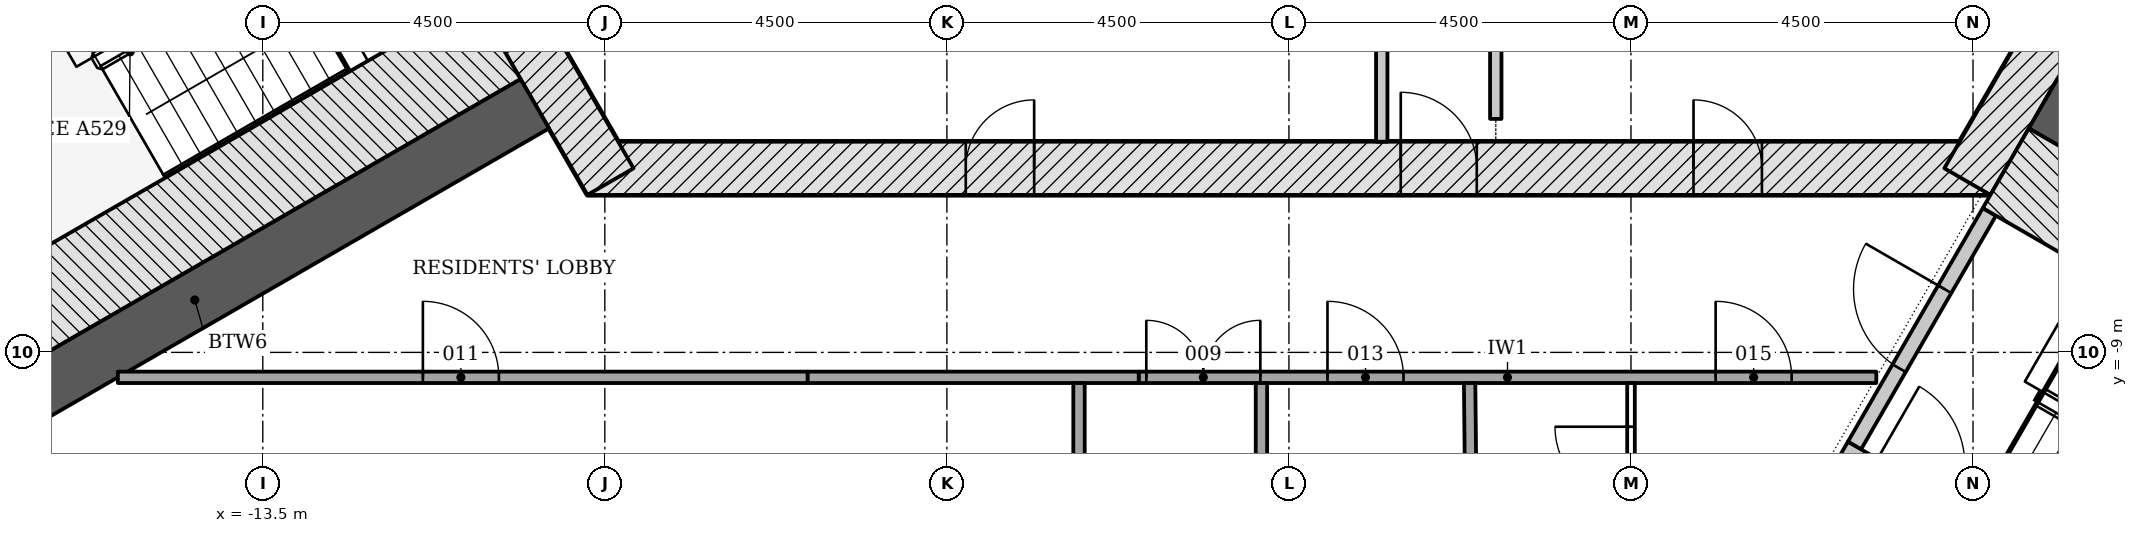
"""IFC4 building model, lengths in metres.
Left out: names, types, materials, properties, quantities, classifications, styles, units other than length and angle.
Written with IfcOpenShell. Run it as: python <this file> out.ifc"""

import sys

from ifc_helpers import new_model, si_unit, direction, frame, frame_2d, origin, place, context, subcontext, project, spatial, polyline, rectangle, outline, extrude, element, fill, save


model = new_model("IFC4")
c1 = context("Model", 3, precision=1e-05, world=origin(), true_north=direction((0.0, 1.0)))
c2 = subcontext(c1, "Body", "Model", "MODEL_VIEW")
j1 = project(units=[si_unit("LENGTHUNIT", "METRE"), si_unit("PLANEANGLEUNIT", "RADIAN")], contexts=[c1])
p1 = place(None, origin())
s1 = spatial("IfcSite", under=j1, at=p1, CompositionType="ELEMENT")
p2 = place(p1, origin())
s2 = spatial("IfcBuilding", under=s1, at=p2, CompositionType="ELEMENT")
p3 = place(p2, frame((0.0, 0.0, 158.1)))
s3 = spatial("IfcBuildingStorey", under=s2, at=p3, CompositionType="ELEMENT", Elevation=158.1)
p4 = place(p3, frame((-9.229, -6.578, -0.2), z_axis=(0.0, 0.0, 1.0), x_axis=(1.0, 0.0, 0.0)))
e1 = element("IfcWall", 1, at=p4, inside=s3, PredefinedType="SHEAR", context=c2, shape_type="SweptSolid", body=[
    extrude(rectangle(XDim=18.458, YDim=0.7, at=frame_2d((9.229, 0.0))), origin(), (0.0, 0.0, 1.0), 3.6),
])
p5 = place(p4, frame((10.7, 0.0, 0.2)))
e2 = element("IfcOpeningElement", 2, at=p5, cuts=e1, PredefinedType="OPENING", context=c2, shape_type="SweptSolid", body=[
    extrude(rectangle(XDim=1.0, YDim=2.1, at=frame_2d((0.5, 1.05))), frame((0.0, 0.36, 0.0), z_axis=(0.0, -1.0, 0.0), x_axis=(1.0, 0.0, 0.0)), (0.0, 0.0, 1.0), 0.72),
])
p6 = place(p4, frame((4.977, 0.0, 0.2)))
e3 = element("IfcOpeningElement", 3, at=p6, cuts=e1, PredefinedType="OPENING", context=c2, shape_type="SweptSolid", body=[
    extrude(rectangle(XDim=0.9, YDim=2.1, at=frame_2d((0.45, 1.05))), frame((0.0, 0.36, 0.0), z_axis=(0.0, -1.0, 0.0), x_axis=(1.0, 0.0, 0.0)), (0.0, 0.0, 1.0), 0.72),
])
p7 = place(p4, frame((14.552, 0.0, 0.2)))
e4 = element("IfcOpeningElement", 4, at=p7, cuts=e1, PredefinedType="OPENING", context=c2, shape_type="SweptSolid", body=[
    extrude(rectangle(XDim=0.9, YDim=2.1, at=frame_2d((0.45, 1.05))), frame((0.0, 0.36, 0.0), z_axis=(0.0, -1.0, 0.0), x_axis=(1.0, 0.0, 0.0)), (0.0, 0.0, 1.0), 0.72),
])
for number, where, z_axis, x_axis in (
    (5, (8.926, -6.753, -0.2), (0.0, 0.0, 1.0), (0.5, 0.866, 0.0)),
    (6, (-10.311, -4.353, -0.2), (0.0, 0.0, 1.0), (0.5, -0.866, 0.0)),
):
    element("IfcWall", number, at=place(p3, frame(where, z_axis=z_axis, x_axis=x_axis)), inside=s3, PredefinedType="SHEAR", context=c2, shape_type="SweptSolid", body=[
        extrude(rectangle(XDim=2.771, YDim=0.7, at=frame_2d((1.386, 0.0))), origin(), (0.0, 0.0, 1.0), 3.6),
    ])
for number, where, z_axis, x_axis in (
    (7, (-9.922, -5.728, -0.2), (0.0, 0.0, 1.0), (-0.866, -0.5, 0.0)),
    (8, (9.922, -5.728, -0.2), (0.0, 0.0, 1.0), (0.866, -0.5, 0.0)),
):
    element("IfcWall", number, at=place(p3, frame(where, z_axis=z_axis, x_axis=x_axis)), inside=s3, PredefinedType="SHEAR", context=c2, shape_type="SweptSolid", body=[
        extrude(rectangle(XDim=10.331, YDim=0.75, at=frame_2d((5.165, 0.0))), origin(), (0.0, 0.0, 1.0), 3.6),
    ])
p8 = place(p3, origin())
e9 = element("IfcWall", 9, at=p8, inside=s3, PredefinedType="NOTDEFINED", context=c2, shape_type="SweptSolid", body=[
    extrude(outline(polyline([(-21.545, -5.731), (-22.663, -8.078), (-23.092, -9.461), (-23.129, -10.908), (-22.773, -12.312), (-22.049, -13.566), (-21.011, -14.576), (-19.739, -15.267), (-18.327, -15.587), (-15.736, -15.793), (-15.712, -15.494), (-18.281, -15.29), (-19.632, -14.984), (-20.832, -14.333), (-21.81, -13.38), (-22.492, -12.198), (-22.828, -10.875), (-22.793, -9.51), (-22.382, -8.187), (-21.275, -5.86), (-21.545, -5.731)])), origin(), (0.0, 0.0, 1.0), 3.3),
])
p9 = place(p3, frame((1.221, 4.711, 0.0), z_axis=(0.0, 0.0, 1.0), x_axis=(0.0, -1.0, 0.0)))
e10 = element("IfcWall", 10, at=p9, inside=s3, PredefinedType="PARTITIONING", context=c2, shape_type="SweptSolid", body=[
    extrude(rectangle(XDim=10.939, YDim=0.15, at=frame_2d((5.47, 0.0))), origin(), (0.0, 0.0, 1.0), 3.4),
])
p10 = place(p9, frame((4.489, 0.0, 0.0)))
e11 = element("IfcOpeningElement", 11, at=p10, cuts=e10, PredefinedType="OPENING", context=c2, shape_type="SweptSolid", body=[
    extrude(rectangle(XDim=1.0, YDim=2.1, at=frame_2d((0.5, 1.05))), frame((0.0, 0.085, 0.0), z_axis=(0.0, -1.0, 0.0), x_axis=(1.0, 0.0, 0.0)), (0.0, 0.0, 1.0), 0.17),
])
p11 = place(p9, frame((0.671, 0.0, 0.0)))
e12 = element("IfcOpeningElement", 12, at=p11, cuts=e10, PredefinedType="OPENING", context=c2, shape_type="SweptSolid", body=[
    extrude(rectangle(XDim=0.9, YDim=2.1, at=frame_2d((0.45, 1.05))), frame((0.0, 0.085, 0.0), z_axis=(0.0, -1.0, 0.0), x_axis=(1.0, 0.0, 0.0)), (0.0, 0.0, 1.0), 0.17),
])
p12 = place(p3, frame((2.721, -5.928, 0.0), z_axis=(0.0, 0.0, 1.0), x_axis=(0.0, 1.0, 0.0)))
e13 = element("IfcWall", 13, at=p12, inside=s3, PredefinedType="PARTITIONING", context=c2, shape_type="SweptSolid", body=[
    extrude(rectangle(XDim=8.041, YDim=0.15, at=frame_2d((4.021, 0.0))), origin(), (0.0, 0.0, 1.0), 3.4),
])
p13 = place(p12, frame((5.02, 0.0, 0.0)))
e14 = element("IfcOpeningElement", 14, at=p13, cuts=e13, PredefinedType="OPENING", context=c2, shape_type="SweptSolid", body=[
    extrude(rectangle(XDim=0.9, YDim=2.1, at=frame_2d((0.45, 1.05))), frame((0.0, 0.085, 0.0), z_axis=(0.0, -1.0, 0.0), x_axis=(1.0, 0.0, 0.0)), (0.0, 0.0, 1.0), 0.17),
])
p14 = place(p3, frame((-10.412, -4.879, -0.2), z_axis=(0.0, 0.0, 1.0), x_axis=(-0.866026919366, -0.499997374926, 0.0)))
e15 = element("IfcWall", 15, at=p14, inside=s3, PredefinedType="SHEAR", context=c2, shape_type="SweptSolid", body=[
    extrude(rectangle(XDim=7.2, YDim=1.211, at=frame_2d((3.6, 0.0))), origin(), (0.0, 0.0, 1.0), 3.6),
])
p15 = place(p3, frame((7.44, -10.226, -0.2), z_axis=(0.0, 0.0, 1.0), x_axis=(0.500022077904, 0.866012656725, 0.0)))
e16 = element("IfcWall", 16, at=p15, inside=s3, PredefinedType="SHEAR", context=c2, shape_type="SweptSolid", body=[
    extrude(rectangle(XDim=3.55, YDim=0.2, at=frame_2d((1.775, 0.0))), origin(), (0.0, 0.0, 1.0), 3.6),
])
p16 = place(p15, frame((1.175, 0.0, 0.2)))
e17 = element("IfcOpeningElement", 17, at=p16, cuts=e16, PredefinedType="OPENING", context=c2, shape_type="SweptSolid", body=[
    extrude(rectangle(XDim=1.2, YDim=2.1, at=frame_2d((0.6, 1.05))), frame((0.0, 0.11, 0.0), z_axis=(0.0, -1.0, 0.0), x_axis=(1.0, 0.0, 0.0)), (0.0, 0.0, 1.0), 0.22),
])
p17 = place(p3, frame((7.304, -10.262, -0.2), z_axis=(0.0, 0.0, 1.0), x_axis=(0.866026594901, -0.49999793692, 0.0)))
e18 = element("IfcWall", 18, at=p17, inside=s3, PredefinedType="SHEAR", context=c2, shape_type="SweptSolid", body=[
    extrude(rectangle(XDim=5.6, YDim=0.2, at=frame_2d((2.8, 0.0))), origin(), (0.0, 0.0, 1.0), 3.6),
])
p18 = place(p17, frame((0.45, 0.0, 0.2)))
e19 = element("IfcOpeningElement", 19, at=p18, cuts=e18, PredefinedType="OPENING", context=c2, shape_type="SweptSolid", body=[
    extrude(rectangle(XDim=1.2, YDim=2.1, at=frame_2d((0.6, 1.05))), frame((0.0, 0.11, 0.0), z_axis=(0.0, -1.0, 0.0), x_axis=(1.0, 0.0, 0.0)), (0.0, 0.0, 1.0), 0.22),
])
p19 = place(p3, frame((9.431, -6.577, -0.2), z_axis=(0.0, 0.0, 1.0), x_axis=(0.866018442252, -0.500012057535, 0.0)))
e20 = element("IfcWall", 20, at=p19, inside=s3, PredefinedType="SHEAR", context=c2, shape_type="SweptSolid", body=[
    extrude(rectangle(XDim=7.2, YDim=1.211, at=frame_2d((3.6, 0.0))), origin(), (0.0, 0.0, 1.0), 3.6),
])
p20 = place(p3, frame((15.782, -8.679, 0.0), z_axis=(0.0, 0.0, 1.0), x_axis=(-0.499998343211, 0.86602636033, 0.0)))
e21 = element("IfcWall", 21, at=p20, inside=s3, PredefinedType="PARTITIONING", context=c2, shape_type="SweptSolid", body=[
    extrude(rectangle(XDim=13.431, YDim=0.15, at=frame_2d((6.715, 0.0))), origin(), (0.0, 0.0, 1.0), 2.847),
])
p21 = place(p20, frame((6.396, 0.0, 0.0)))
e22 = element("IfcOpeningElement", 22, at=p21, cuts=e21, PredefinedType="OPENING", context=c2, shape_type="SweptSolid", body=[
    extrude(rectangle(XDim=1.0, YDim=2.1, at=frame_2d((0.5, 1.05))), frame((0.0, 0.085, 0.0), z_axis=(0.0, -1.0, 0.0), x_axis=(1.0, 0.0, 0.0)), (0.0, 0.0, 1.0), 0.17),
])
p22 = place(p20, frame((11.869, 0.0, 0.0)))
e23 = element("IfcOpeningElement", 23, at=p22, cuts=e21, PredefinedType="OPENING", context=c2, shape_type="SweptSolid", body=[
    extrude(rectangle(XDim=1.0, YDim=2.1, at=frame_2d((0.5, 1.05))), frame((0.0, 0.085, 0.0), z_axis=(0.0, -1.0, 0.0), x_axis=(1.0, 0.0, 0.0)), (0.0, 0.0, 1.0), 0.17),
])
p23 = place(p20, frame((9.691, 0.0, 0.0)))
e24 = element("IfcOpeningElement", 24, at=p23, cuts=e21, PredefinedType="OPENING", context=c2, shape_type="SweptSolid", body=[
    extrude(rectangle(XDim=1.0, YDim=2.1, at=frame_2d((0.5, 1.05))), frame((0.0, 0.085, 0.0), z_axis=(0.0, -1.0, 0.0), x_axis=(1.0, 0.0, 0.0)), (0.0, 0.0, 1.0), 0.17),
])
p24 = place(p3, frame((-15.407, -9.328, 0.0), z_axis=(0.0, 0.0, 1.0), x_axis=(1.0, 0.0, 0.0)))
e25 = element("IfcWall", 25, at=p24, inside=s3, PredefinedType="PARTITIONING", context=c2, shape_type="SweptSolid", body=[
    extrude(rectangle(XDim=9.076, YDim=0.15, at=frame_2d((4.538, 0.0))), origin(), (0.0, 0.0, 1.0), 2.847),
])
p25 = place(p24, frame((4.013, 0.0, 0.0)))
e26 = element("IfcOpeningElement", 26, at=p25, cuts=e25, PredefinedType="OPENING", context=c2, shape_type="SweptSolid", body=[
    extrude(rectangle(XDim=1.0, YDim=2.1, at=frame_2d((0.5, 1.05))), frame((0.0, 0.085, 0.0), z_axis=(0.0, -1.0, 0.0), x_axis=(1.0, 0.0, 0.0)), (0.0, 0.0, 1.0), 0.17),
])
p26 = place(p3, frame((-1.976, -9.328, 0.0), z_axis=(0.0, 0.0, 1.0), x_axis=(1.0, 0.0, 0.0)))
e27 = element("IfcWall", 27, at=p26, inside=s3, PredefinedType="PARTITIONING", context=c2, shape_type="SweptSolid", body=[
    extrude(rectangle(XDim=9.704, YDim=0.15, at=frame_2d((4.852, 0.0))), origin(), (0.0, 0.0, 1.0), 2.847),
])
p27 = place(p26, frame((0.1, 0.0, 0.0)))
e28 = element("IfcOpeningElement", 28, at=p27, cuts=e27, PredefinedType="OPENING", context=c2, shape_type="SweptSolid", body=[
    extrude(rectangle(XDim=1.5, YDim=2.1, at=frame_2d((0.75, 1.05))), frame((0.0, 0.085, 0.0), z_axis=(0.0, -1.0, 0.0), x_axis=(1.0, 0.0, 0.0)), (0.0, 0.0, 1.0), 0.17),
])
p28 = place(p26, frame((2.484, 0.0, 0.0)))
e29 = element("IfcOpeningElement", 29, at=p28, cuts=e27, PredefinedType="OPENING", context=c2, shape_type="SweptSolid", body=[
    extrude(rectangle(XDim=1.0, YDim=2.1, at=frame_2d((0.5, 1.05))), frame((0.0, 0.085, 0.0), z_axis=(0.0, -1.0, 0.0), x_axis=(1.0, 0.0, 0.0)), (0.0, 0.0, 1.0), 0.17),
])
p29 = place(p26, frame((7.59, 0.0, 0.0)))
e30 = element("IfcOpeningElement", 30, at=p29, cuts=e27, PredefinedType="OPENING", context=c2, shape_type="SweptSolid", body=[
    extrude(rectangle(XDim=1.0, YDim=2.1, at=frame_2d((0.5, 1.05))), frame((0.0, 0.085, 0.0), z_axis=(0.0, -1.0, 0.0), x_axis=(1.0, 0.0, 0.0)), (0.0, 0.0, 1.0), 0.17),
])
p30 = place(p3, frame((-6.331, -9.328, 0.0), z_axis=(0.0, 0.0, 1.0), x_axis=(1.0, 0.0, 0.0)))
e31 = element("IfcWall", 31, at=p30, inside=s3, PredefinedType="PARTITIONING", context=c2, shape_type="SweptSolid", body=[
    extrude(rectangle(XDim=4.354, YDim=0.15, at=frame_2d((2.177, 0.0))), origin(), (0.0, 0.0, 1.0), 2.847),
])
p31 = place(p3, frame((2.443, -15.655, 0.0), z_axis=(0.0, 0.0, 1.0), x_axis=(-0.010466132445, 0.999945228536, 0.0)))
e32 = element("IfcWall", 32, at=p31, inside=s3, PredefinedType="PARTITIONING", context=c2, shape_type="SweptSolid", body=[
    extrude(rectangle(XDim=6.251, YDim=0.15, at=frame_2d((3.126, 0.0))), origin(), (0.0, 0.0, 1.0), 3.4),
])
p32 = place(p3, frame((-2.762, -9.403, 0.0), z_axis=(0.0, 0.0, 1.0), x_axis=(0.0, -1.0, 0.0)))
e33 = element("IfcWall", 33, at=p32, inside=s3, PredefinedType="PARTITIONING", context=c2, shape_type="SweptSolid", body=[
    extrude(rectangle(XDim=4.183, YDim=0.15, at=frame_2d((2.092, 0.0))), origin(), (0.0, 0.0, 1.0), 3.4),
])
p33 = place(p3, frame((-0.362, -9.403, 0.0), z_axis=(0.0, 0.0, 1.0), x_axis=(0.0, -1.0, 0.0)))
e34 = element("IfcWall", 34, at=p33, inside=s3, PredefinedType="PARTITIONING", context=c2, shape_type="SweptSolid", body=[
    extrude(rectangle(XDim=4.183, YDim=0.15, at=frame_2d((2.092, 0.0))), origin(), (0.0, 0.0, 1.0), 3.4),
])
p34 = place(p33, frame((3.083, 0.0, 0.0)))
e35 = element("IfcOpeningElement", 35, at=p34, cuts=e34, PredefinedType="OPENING", context=c2, shape_type="SweptSolid", body=[
    extrude(rectangle(XDim=1.0, YDim=2.1, at=frame_2d((0.5, 1.05))), frame((0.0, 0.085, 0.0), z_axis=(0.0, -1.0, 0.0), x_axis=(1.0, 0.0, 0.0)), (0.0, 0.0, 1.0), 0.17),
])
p35 = place(p3, frame((4.5, -11.578, 0.0), z_axis=(0.0, 0.0, 1.0), x_axis=(0.0, 1.0, 0.0)))
e36 = element("IfcWall", 36, at=p35, inside=s3, PredefinedType="PARTITIONING", context=c2, shape_type="SweptSolid", body=[
    extrude(rectangle(XDim=2.175, YDim=0.1, at=frame_2d((1.087, 0.0))), origin(), (0.0, 0.0, 1.0), 3.4),
])
p36 = place(p35, frame((0.6, 0.0, 0.0)))
e37 = element("IfcOpeningElement", 37, at=p36, cuts=e36, PredefinedType="OPENING", context=c2, shape_type="SweptSolid", body=[
    extrude(rectangle(XDim=1.0, YDim=2.1, at=frame_2d((0.5, 1.05))), frame((0.0, 0.06, 0.0), z_axis=(0.0, -1.0, 0.0), x_axis=(1.0, 0.0, 0.0)), (0.0, 0.0, 1.0), 0.12),
])
p37 = place(p5, origin())
e38 = element("IfcDoor", 38, at=p37, inside=s3, OperationType="SINGLE_SWING_LEFT", PredefinedType="DOOR", context=c2, shape_type="SweptSolid", body=[
    extrude(rectangle(XDim=1.0, YDim=2.1, at=frame_2d((0.5, 1.05))), frame((0.0, 0.075, 0.0), z_axis=(0.0, -1.0, 0.0), x_axis=(1.0, 0.0, 0.0)), (0.0, 0.0, 1.0), 0.15),
])
fill(e2, e38)
p38 = place(p6, origin())
e39 = element("IfcDoor", 39, at=p38, inside=s3, OperationType="SINGLE_SWING_RIGHT", PredefinedType="DOOR", context=c2, shape_type="SweptSolid", body=[
    extrude(rectangle(XDim=0.9, YDim=2.1, at=frame_2d((0.45, 1.05))), frame((0.0, 0.075, 0.0), z_axis=(0.0, -1.0, 0.0), x_axis=(1.0, 0.0, 0.0)), (0.0, 0.0, 1.0), 0.15),
])
fill(e3, e39)
p39 = place(p7, origin())
e40 = element("IfcDoor", 40, at=p39, inside=s3, OperationType="SINGLE_SWING_LEFT", PredefinedType="DOOR", context=c2, shape_type="SweptSolid", body=[
    extrude(rectangle(XDim=0.9, YDim=2.1, at=frame_2d((0.45, 1.05))), frame((0.0, 0.075, 0.0), z_axis=(0.0, -1.0, 0.0), x_axis=(1.0, 0.0, 0.0)), (0.0, 0.0, 1.0), 0.15),
])
fill(e4, e40)
p40 = place(p16, origin())
e41 = element("IfcDoor", 41, at=p40, inside=s3, OperationType="SINGLE_SWING_RIGHT", PredefinedType="DOOR", context=c2, shape_type="SweptSolid", body=[
    extrude(rectangle(XDim=1.2, YDim=2.1, at=frame_2d((0.6, 1.05))), frame((0.0, 0.025, 0.0), z_axis=(0.0, -1.0, 0.0), x_axis=(1.0, 0.0, 0.0)), (0.0, 0.0, 1.0), 0.05),
])
fill(e17, e41)
p41 = place(p27, origin())
e42 = element("IfcDoor", 42, at=p41, inside=s3, OperationType="DOUBLE_DOOR_SINGLE_SWING", PredefinedType="DOOR", context=c2, shape_type="SweptSolid", body=[
    extrude(rectangle(XDim=1.5, YDim=2.1, at=frame_2d((0.75, 1.05))), frame((0.0, 0.025, 0.0), z_axis=(0.0, -1.0, 0.0), x_axis=(1.0, 0.0, 0.0)), (0.0, 0.0, 1.0), 0.05),
])
fill(e28, e42)
p42 = place(p25, origin())
e43 = element("IfcDoor", 43, at=p42, inside=s3, OperationType="SINGLE_SWING_LEFT", PredefinedType="DOOR", context=c2, shape_type="SweptSolid", body=[
    extrude(rectangle(XDim=1.0, YDim=2.1, at=frame_2d((0.5, 1.05))), frame((0.0, 0.025, 0.0), z_axis=(0.0, -1.0, 0.0), x_axis=(1.0, 0.0, 0.0)), (0.0, 0.0, 1.0), 0.05),
])
fill(e26, e43)
p43 = place(p28, origin())
e44 = element("IfcDoor", 44, at=p43, inside=s3, OperationType="SINGLE_SWING_LEFT", PredefinedType="DOOR", context=c2, shape_type="SweptSolid", body=[
    extrude(rectangle(XDim=1.0, YDim=2.1, at=frame_2d((0.5, 1.05))), frame((0.0, 0.025, 0.0), z_axis=(0.0, -1.0, 0.0), x_axis=(1.0, 0.0, 0.0)), (0.0, 0.0, 1.0), 0.05),
])
fill(e29, e44)
p44 = place(p36, origin())
e45 = element("IfcDoor", 45, at=p44, inside=s3, OperationType="SINGLE_SWING_RIGHT", PredefinedType="DOOR", context=c2, shape_type="SweptSolid", body=[
    extrude(rectangle(XDim=1.0, YDim=2.1, at=frame_2d((0.5, 1.05))), frame((0.0, 0.025, 0.0), z_axis=(0.0, -1.0, 0.0), x_axis=(1.0, 0.0, 0.0)), (0.0, 0.0, 1.0), 0.05),
])
fill(e37, e45)
p45 = place(p29, origin())
e46 = element("IfcDoor", 46, at=p45, inside=s3, OperationType="SINGLE_SWING_LEFT", PredefinedType="DOOR", context=c2, shape_type="SweptSolid", body=[
    extrude(rectangle(XDim=1.0, YDim=2.1, at=frame_2d((0.5, 1.05))), frame((0.0, 0.025, 0.0), z_axis=(0.0, -1.0, 0.0), x_axis=(1.0, 0.0, 0.0)), (0.0, 0.0, 1.0), 0.05),
])
fill(e30, e46)
save(model, sys.argv[1])
